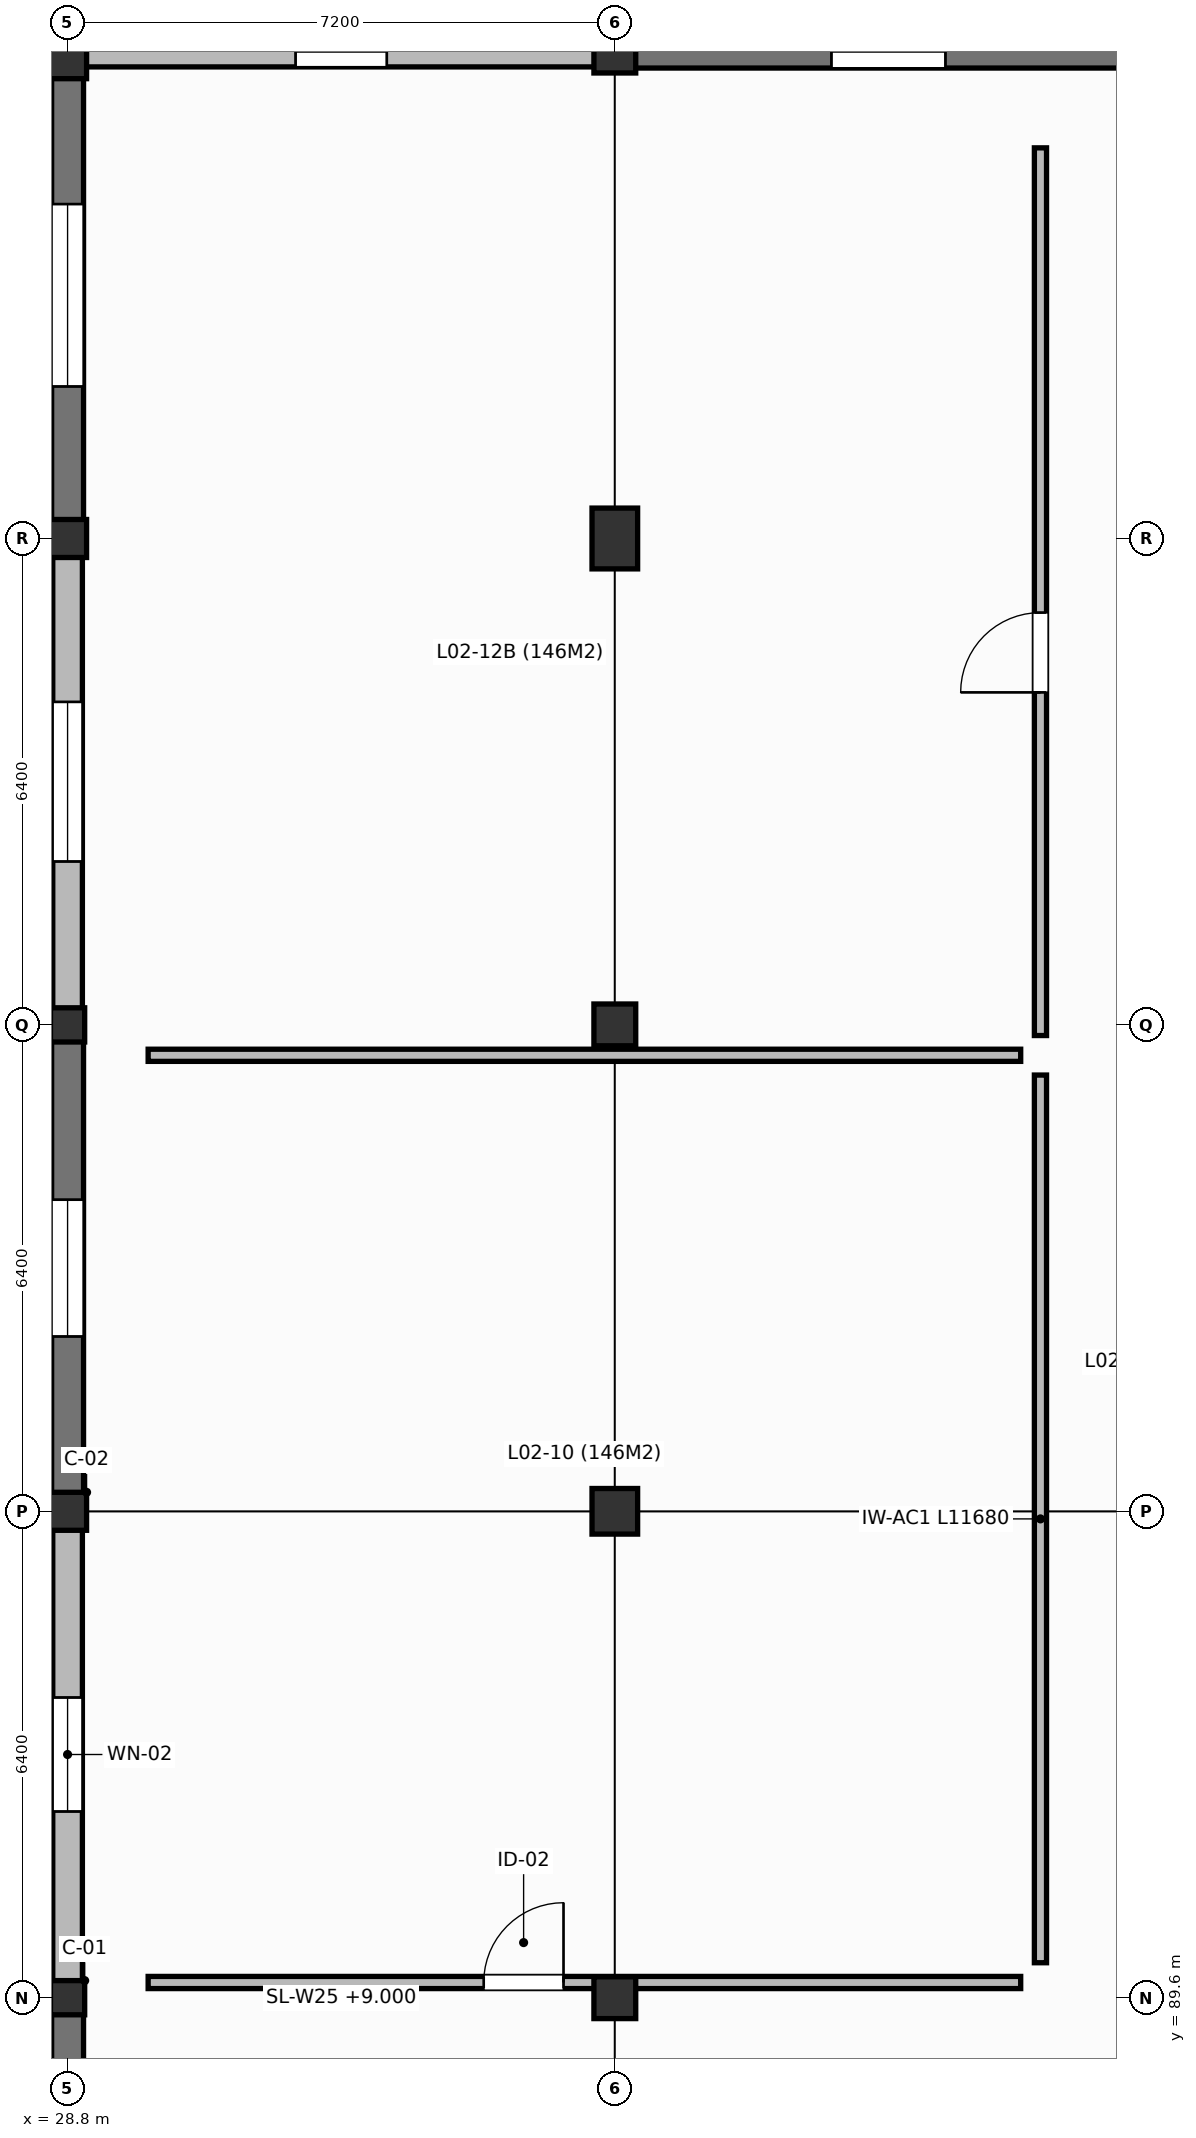
"""IFC4 building model, lengths in metres.
Left out: names, types, materials, properties, quantities, classifications, styles, units other than length and angle.
Written with IfcOpenShell. Run it as: python <this file> out.ifc"""

import sys

from ifc_helpers import new_model, si_unit, direction, frame, frame_2d, origin, origin_2d, place, context, subcontext, project, spatial, rectangle, extrude, element, fill, save


model = new_model("IFC4")
c1 = context("Model", 3, precision=1e-05, world=origin(), true_north=direction((0.0, 1.0)))
c2 = subcontext(c1, "Body", "Model", "MODEL_VIEW")
j1 = project(units=[si_unit("LENGTHUNIT", "METRE"), si_unit("PLANEANGLEUNIT", "RADIAN")], contexts=[c1])
p1 = place(None, origin())
s1 = spatial("IfcSite", under=j1, at=p1, CompositionType="ELEMENT")
p2 = place(p1, origin())
s2 = spatial("IfcBuilding", under=s1, at=p2, CompositionType="ELEMENT")
p3 = place(p2, frame((0.0, 0.0, 9.0)))
s3 = spatial("IfcBuildingStorey", under=s2, at=p3, CompositionType="ELEMENT", Elevation=9.0)
p4 = place(p3, frame((28.8, 89.6, 0.0), z_axis=(0.0, 0.0, 1.0), x_axis=(1.0, 0.0, 0.0)))
e1 = element("IfcColumn", 1, at=p4, inside=s3, PredefinedType="COLUMN", context=c2, shape_type="SweptSolid", body=[
    extrude(rectangle(XDim=0.45, YDim=0.45, at=origin_2d()), origin(), (0.0, 0.0, 1.0), 4.2),
])
p5 = place(p3, frame((28.8, 96.0, 0.0), z_axis=(0.0, 0.0, 1.0), x_axis=(1.0, 0.0, 0.0)))
e2 = element("IfcColumn", 2, at=p5, inside=s3, PredefinedType="COLUMN", context=c2, shape_type="SweptSolid", body=[
    extrude(rectangle(XDim=0.5, YDim=0.5, at=origin_2d()), origin(), (0.0, 0.0, 1.0), 4.2),
])
p6 = place(p3, frame((28.8, 102.4, 0.0), z_axis=(0.0, 0.0, 1.0), x_axis=(1.0, 0.0, 0.0)))
e3 = element("IfcColumn", 3, at=p6, inside=s3, PredefinedType="COLUMN", context=c2, shape_type="SweptSolid", body=[
    extrude(rectangle(XDim=0.45, YDim=0.45, at=origin_2d()), origin(), (0.0, 0.0, 1.0), 4.2),
])
p7 = place(p3, frame((28.8, 108.8, 0.0), z_axis=(0.0, 0.0, 1.0), x_axis=(1.0, 0.0, 0.0)))
e4 = element("IfcColumn", 4, at=p7, inside=s3, PredefinedType="COLUMN", context=c2, shape_type="SweptSolid", body=[
    extrude(rectangle(XDim=0.5, YDim=0.5, at=origin_2d()), origin(), (0.0, 0.0, 1.0), 4.2),
])
p8 = place(p3, frame((28.8, 115.2, 0.0), z_axis=(0.0, 0.0, 1.0), x_axis=(1.0, 0.0, 0.0)))
e5 = element("IfcColumn", 5, at=p8, inside=s3, PredefinedType="COLUMN", context=c2, shape_type="SweptSolid", body=[
    extrude(rectangle(XDim=0.5, YDim=0.7, at=origin_2d()), origin(), (0.0, 0.0, 1.0), 4.2),
])
p9 = place(p3, frame((36.0, 89.6, 0.0), z_axis=(0.0, 0.0, 1.0), x_axis=(1.0, 0.0, 0.0)))
e6 = element("IfcColumn", 6, at=p9, inside=s3, PredefinedType="COLUMN", context=c2, shape_type="SweptSolid", body=[
    extrude(rectangle(XDim=0.55, YDim=0.55, at=origin_2d()), origin(), (0.0, 0.0, 1.0), 4.2),
])
p10 = place(p3, frame((36.0, 96.0, 0.0), z_axis=(0.0, 0.0, 1.0), x_axis=(1.0, 0.0, 0.0)))
e7 = element("IfcColumn", 7, at=p10, inside=s3, PredefinedType="COLUMN", context=c2, shape_type="SweptSolid", body=[
    extrude(rectangle(XDim=0.6, YDim=0.6, at=origin_2d()), origin(), (0.0, 0.0, 1.0), 4.2),
])
p11 = place(p3, frame((36.0, 102.4, 0.0), z_axis=(0.0, 0.0, 1.0), x_axis=(1.0, 0.0, 0.0)))
e8 = element("IfcColumn", 8, at=p11, inside=s3, PredefinedType="COLUMN", context=c2, shape_type="SweptSolid", body=[
    extrude(rectangle(XDim=0.55, YDim=0.55, at=origin_2d()), origin(), (0.0, 0.0, 1.0), 4.2),
])
p12 = place(p3, frame((36.0, 108.8, 0.0), z_axis=(0.0, 0.0, 1.0), x_axis=(1.0, 0.0, 0.0)))
e9 = element("IfcColumn", 9, at=p12, inside=s3, PredefinedType="COLUMN", context=c2, shape_type="SweptSolid", body=[
    extrude(rectangle(XDim=0.6, YDim=0.8, at=origin_2d()), origin(), (0.0, 0.0, 1.0), 4.2),
])
p13 = place(p3, frame((36.0, 115.2, 0.0), z_axis=(0.0, 0.0, 1.0), x_axis=(1.0, 0.0, 0.0)))
e10 = element("IfcColumn", 10, at=p13, inside=s3, PredefinedType="COLUMN", context=c2, shape_type="SweptSolid", body=[
    extrude(rectangle(XDim=0.55, YDim=0.55, at=origin_2d()), origin(), (0.0, 0.0, 1.0), 4.2),
])
p14 = place(p3, frame((28.8, 83.2, 0.0), z_axis=(0.0, 0.0, 1.0), x_axis=(0.0, 1.0, 0.0)))
e11 = element("IfcWall", 11, at=p14, inside=s3, PredefinedType="STANDARD", context=c2, shape_type="SweptSolid", body=[
    extrude(rectangle(XDim=6.4, YDim=0.42, at=frame_2d((3.2, 0.0))), origin(), (0.0, 0.0, 1.0), 3.84),
])
p15 = place(p14, frame((2.6, 0.0, 0.8)))
e12 = element("IfcOpeningElement", 12, at=p15, cuts=e11, PredefinedType="OPENING", context=c2, shape_type="SweptSolid", body=[
    extrude(rectangle(XDim=1.2, YDim=1.65, at=frame_2d((0.6, 0.825))), frame((0.0, 0.22, 0.0), z_axis=(0.0, -1.0, 0.0), x_axis=(1.0, 0.0, 0.0)), (0.0, 0.0, 1.0), 0.44),
])
p16 = place(p3, frame((28.8, 89.6, 0.0), z_axis=(0.0, 0.0, 1.0), x_axis=(0.0, 1.0, 0.0)))
e13 = element("IfcWall", 13, at=p16, inside=s3, PredefinedType="STANDARD", context=c2, shape_type="SweptSolid", body=[
    extrude(rectangle(XDim=6.4, YDim=0.39, at=frame_2d((3.2, 0.0))), origin(), (0.0, 0.0, 1.0), 2.74),
])
p17 = place(p16, frame((2.45, 0.0, 0.8)))
e14 = element("IfcOpeningElement", 14, at=p17, cuts=e13, PredefinedType="OPENING", context=c2, shape_type="SweptSolid", body=[
    extrude(rectangle(XDim=1.5, YDim=1.65, at=frame_2d((0.75, 0.825))), frame((0.0, 0.205, 0.0), z_axis=(0.0, -1.0, 0.0), x_axis=(1.0, 0.0, 0.0)), (0.0, 0.0, 1.0), 0.41),
])
p18 = place(p3, frame((28.8, 96.0, 0.0), z_axis=(0.0, 0.0, 1.0), x_axis=(0.0, 1.0, 0.0)))
e15 = element("IfcWall", 15, at=p18, inside=s3, PredefinedType="STANDARD", context=c2, shape_type="SweptSolid", body=[
    extrude(rectangle(XDim=6.4, YDim=0.42, at=frame_2d((3.2, 0.0))), origin(), (0.0, 0.0, 1.0), 3.84),
])
p19 = place(p18, frame((2.3, 0.0, 0.8)))
e16 = element("IfcOpeningElement", 16, at=p19, cuts=e15, PredefinedType="OPENING", context=c2, shape_type="SweptSolid", body=[
    extrude(rectangle(XDim=1.8, YDim=1.65, at=frame_2d((0.9, 0.825))), frame((0.0, 0.22, 0.0), z_axis=(0.0, -1.0, 0.0), x_axis=(1.0, 0.0, 0.0)), (0.0, 0.0, 1.0), 0.44),
])
p20 = place(p3, frame((28.8, 102.4, 0.0), z_axis=(0.0, 0.0, 1.0), x_axis=(0.0, 1.0, 0.0)))
e17 = element("IfcWall", 17, at=p20, inside=s3, PredefinedType="STANDARD", context=c2, shape_type="SweptSolid", body=[
    extrude(rectangle(XDim=6.4, YDim=0.39, at=frame_2d((3.2, 0.0))), origin(), (0.0, 0.0, 1.0), 2.64),
])
p21 = place(p20, frame((2.15, 0.0, 0.8)))
e18 = element("IfcOpeningElement", 18, at=p21, cuts=e17, PredefinedType="OPENING", context=c2, shape_type="SweptSolid", body=[
    extrude(rectangle(XDim=2.1, YDim=1.65, at=frame_2d((1.05, 0.825))), frame((0.0, 0.205, 0.0), z_axis=(0.0, -1.0, 0.0), x_axis=(1.0, 0.0, 0.0)), (0.0, 0.0, 1.0), 0.41),
])
p22 = place(p3, frame((28.8, 108.8, 0.0), z_axis=(0.0, 0.0, 1.0), x_axis=(0.0, 1.0, 0.0)))
e19 = element("IfcWall", 19, at=p22, inside=s3, PredefinedType="STANDARD", context=c2, shape_type="SweptSolid", body=[
    extrude(rectangle(XDim=6.4, YDim=0.42, at=frame_2d((3.2, 0.0))), origin(), (0.0, 0.0, 1.0), 3.84),
])
p23 = place(p22, frame((2.0, 0.0, 0.8)))
e20 = element("IfcOpeningElement", 20, at=p23, cuts=e19, PredefinedType="OPENING", context=c2, shape_type="SweptSolid", body=[
    extrude(rectangle(XDim=2.4, YDim=1.65, at=frame_2d((1.2, 0.825))), frame((0.0, 0.22, 0.0), z_axis=(0.0, -1.0, 0.0), x_axis=(1.0, 0.0, 0.0)), (0.0, 0.0, 1.0), 0.44),
])
p24 = place(p3, frame((28.8, 115.2, 0.0), z_axis=(0.0, 0.0, 1.0), x_axis=(1.0, 0.0, 0.0)))
e21 = element("IfcWall", 21, at=p24, inside=s3, PredefinedType="STANDARD", context=c2, shape_type="SweptSolid", body=[
    extrude(rectangle(XDim=7.2, YDim=0.39, at=frame_2d((3.6, 0.0))), origin(), (0.0, 0.0, 1.0), 3.29),
])
p25 = place(p24, frame((3.0, 0.0, 0.8)))
e22 = element("IfcOpeningElement", 22, at=p25, cuts=e21, PredefinedType="OPENING", context=c2, shape_type="SweptSolid", body=[
    extrude(rectangle(XDim=1.2, YDim=1.45, at=frame_2d((0.6, 0.725))), frame((0.0, 0.205, 0.0), z_axis=(0.0, -1.0, 0.0), x_axis=(1.0, 0.0, 0.0)), (0.0, 0.0, 1.0), 0.41),
])
p26 = place(p3, frame((36.0, 115.2, 0.0), z_axis=(0.0, 0.0, 1.0), x_axis=(1.0, 0.0, 0.0)))
e23 = element("IfcWall", 23, at=p26, inside=s3, PredefinedType="STANDARD", context=c2, shape_type="SweptSolid", body=[
    extrude(rectangle(XDim=7.2, YDim=0.42, at=frame_2d((3.6, 0.0))), origin(), (0.0, 0.0, 1.0), 3.84),
])
p27 = place(p26, frame((2.85, 0.0, 0.8)))
e24 = element("IfcOpeningElement", 24, at=p27, cuts=e23, PredefinedType="OPENING", context=c2, shape_type="SweptSolid", body=[
    extrude(rectangle(XDim=1.5, YDim=1.45, at=frame_2d((0.75, 0.725))), frame((0.0, 0.22, 0.0), z_axis=(0.0, -1.0, 0.0), x_axis=(1.0, 0.0, 0.0)), (0.0, 0.0, 1.0), 0.44),
])
p28 = place(p3, frame((28.6, 115.0, 0.0), z_axis=(0.0, 0.0, 1.0), x_axis=(-1.0, 0.0, 0.0)))
e25 = element("IfcWall", 25, at=p28, inside=s3, PredefinedType="PARAPET", context=c2, shape_type="SweptSolid", body=[
    extrude(rectangle(XDim=6.8, YDim=0.24, at=frame_2d((3.4, 0.0))), origin(), (0.0, 0.0, 1.0), 1.15),
])
p29 = place(p3, frame((29.86, 89.8, 0.0), z_axis=(0.0, 0.0, 1.0), x_axis=(1.0, 0.0, 0.0)))
e26 = element("IfcWall", 26, at=p29, inside=s3, PredefinedType="PARTITIONING", context=c2, shape_type="SweptSolid", body=[
    extrude(rectangle(XDim=11.48, YDim=0.16, at=frame_2d((5.74, 0.0))), origin(), (0.0, 0.0, 1.0), 3.165),
])
p30 = place(p29, frame((4.415, 0.0, 0.0)))
e27 = element("IfcOpeningElement", 27, at=p30, cuts=e26, PredefinedType="OPENING", context=c2, shape_type="SweptSolid", body=[
    extrude(rectangle(XDim=1.05, YDim=2.1, at=frame_2d((0.525, 1.05))), frame((0.0, 0.09, 0.0), z_axis=(0.0, -1.0, 0.0), x_axis=(1.0, 0.0, 0.0)), (0.0, 0.0, 1.0), 0.18),
])
p31 = place(p3, frame((41.6, 90.06, 0.0), z_axis=(0.0, 0.0, 1.0), x_axis=(0.0, 1.0, 0.0)))
e28 = element("IfcWall", 28, at=p31, inside=s3, PredefinedType="PARTITIONING", context=c2, shape_type="SweptSolid", body=[
    extrude(rectangle(XDim=11.68, YDim=0.16, at=frame_2d((5.84, 0.0))), origin(), (0.0, 0.0, 1.0), 3.84),
])
p32 = place(p3, frame((41.34, 102.0, 0.0), z_axis=(0.0, 0.0, 1.0), x_axis=(-1.0, 0.0, 0.0)))
e29 = element("IfcWall", 29, at=p32, inside=s3, PredefinedType="PARTITIONING", context=c2, shape_type="SweptSolid", body=[
    extrude(rectangle(XDim=11.48, YDim=0.16, at=frame_2d((5.74, 0.0))), origin(), (0.0, 0.0, 1.0), 3.065),
])
p33 = place(p3, frame((41.6, 102.26, 0.0), z_axis=(0.0, 0.0, 1.0), x_axis=(0.0, 1.0, 0.0)))
e30 = element("IfcWall", 30, at=p33, inside=s3, PredefinedType="PARTITIONING", context=c2, shape_type="SweptSolid", body=[
    extrude(rectangle(XDim=11.68, YDim=0.16, at=frame_2d((5.84, 0.0))), origin(), (0.0, 0.0, 1.0), 3.84),
])
p34 = place(p33, frame((4.515, 0.0, 0.0)))
e31 = element("IfcOpeningElement", 31, at=p34, cuts=e30, PredefinedType="OPENING", context=c2, shape_type="SweptSolid", body=[
    extrude(rectangle(XDim=1.05, YDim=2.1, at=frame_2d((0.525, 1.05))), frame((0.0, 0.09, 0.0), z_axis=(0.0, -1.0, 0.0), x_axis=(1.0, 0.0, 0.0)), (0.0, 0.0, 1.0), 0.18),
])
p35 = place(p17, origin())
e32 = element("IfcWindow", 32, at=p35, inside=s3, PartitioningType="SINGLE_PANEL", PredefinedType="WINDOW", context=c2, shape_type="SweptSolid", body=[
    extrude(rectangle(XDim=1.5, YDim=1.65, at=frame_2d((0.75, 0.825))), frame((0.0, 0.03, 0.0), z_axis=(0.0, -1.0, 0.0), x_axis=(1.0, 0.0, 0.0)), (0.0, 0.0, 1.0), 0.06),
])
fill(e14, e32)
p36 = place(p19, origin())
e33 = element("IfcWindow", 33, at=p36, inside=s3, PartitioningType="SINGLE_PANEL", PredefinedType="WINDOW", context=c2, shape_type="SweptSolid", body=[
    extrude(rectangle(XDim=1.8, YDim=1.65, at=frame_2d((0.9, 0.825))), frame((0.0, 0.03, 0.0), z_axis=(0.0, -1.0, 0.0), x_axis=(1.0, 0.0, 0.0)), (0.0, 0.0, 1.0), 0.06),
])
fill(e16, e33)
p37 = place(p21, origin())
e34 = element("IfcWindow", 34, at=p37, inside=s3, PartitioningType="SINGLE_PANEL", PredefinedType="WINDOW", context=c2, shape_type="SweptSolid", body=[
    extrude(rectangle(XDim=2.1, YDim=1.65, at=frame_2d((1.05, 0.825))), frame((0.0, 0.03, 0.0), z_axis=(0.0, -1.0, 0.0), x_axis=(1.0, 0.0, 0.0)), (0.0, 0.0, 1.0), 0.06),
])
fill(e18, e34)
p38 = place(p23, origin())
e35 = element("IfcWindow", 35, at=p38, inside=s3, PartitioningType="TRIPLE_PANEL_VERTICAL", PredefinedType="WINDOW", context=c2, shape_type="SweptSolid", body=[
    extrude(rectangle(XDim=2.4, YDim=1.65, at=frame_2d((1.2, 0.825))), frame((0.0, 0.03, 0.0), z_axis=(0.0, -1.0, 0.0), x_axis=(1.0, 0.0, 0.0)), (0.0, 0.0, 1.0), 0.06),
])
fill(e20, e35)
p39 = place(p25, origin())
e36 = element("IfcWindow", 36, at=p39, inside=s3, PartitioningType="SINGLE_PANEL", PredefinedType="WINDOW", context=c2, shape_type="SweptSolid", body=[
    extrude(rectangle(XDim=1.2, YDim=1.45, at=frame_2d((0.6, 0.725))), frame((0.0, 0.03, 0.0), z_axis=(0.0, -1.0, 0.0), x_axis=(1.0, 0.0, 0.0)), (0.0, 0.0, 1.0), 0.06),
])
fill(e22, e36)
p40 = place(p27, origin())
e37 = element("IfcWindow", 37, at=p40, inside=s3, PartitioningType="SINGLE_PANEL", PredefinedType="WINDOW", context=c2, shape_type="SweptSolid", body=[
    extrude(rectangle(XDim=1.5, YDim=1.45, at=frame_2d((0.75, 0.725))), frame((0.0, 0.03, 0.0), z_axis=(0.0, -1.0, 0.0), x_axis=(1.0, 0.0, 0.0)), (0.0, 0.0, 1.0), 0.06),
])
fill(e24, e37)
p41 = place(p30, origin())
e38 = element("IfcDoor", 38, at=p41, inside=s3, OperationType="SINGLE_SWING_RIGHT", PredefinedType="DOOR", context=c2, shape_type="SweptSolid", body=[
    extrude(rectangle(XDim=1.05, YDim=2.1, at=frame_2d((0.525, 1.05))), frame((0.0, 0.025, 0.0), z_axis=(0.0, -1.0, 0.0), x_axis=(1.0, 0.0, 0.0)), (0.0, 0.0, 1.0), 0.05),
])
fill(e27, e38)
p42 = place(p34, origin())
e39 = element("IfcDoor", 39, at=p42, inside=s3, OperationType="SINGLE_SWING_LEFT", PredefinedType="DOOR", context=c2, shape_type="SweptSolid", body=[
    extrude(rectangle(XDim=1.05, YDim=2.1, at=frame_2d((0.525, 1.05))), frame((0.0, 0.025, 0.0), z_axis=(0.0, -1.0, 0.0), x_axis=(1.0, 0.0, 0.0)), (0.0, 0.0, 1.0), 0.05),
])
fill(e31, e39)
save(model, sys.argv[1])
